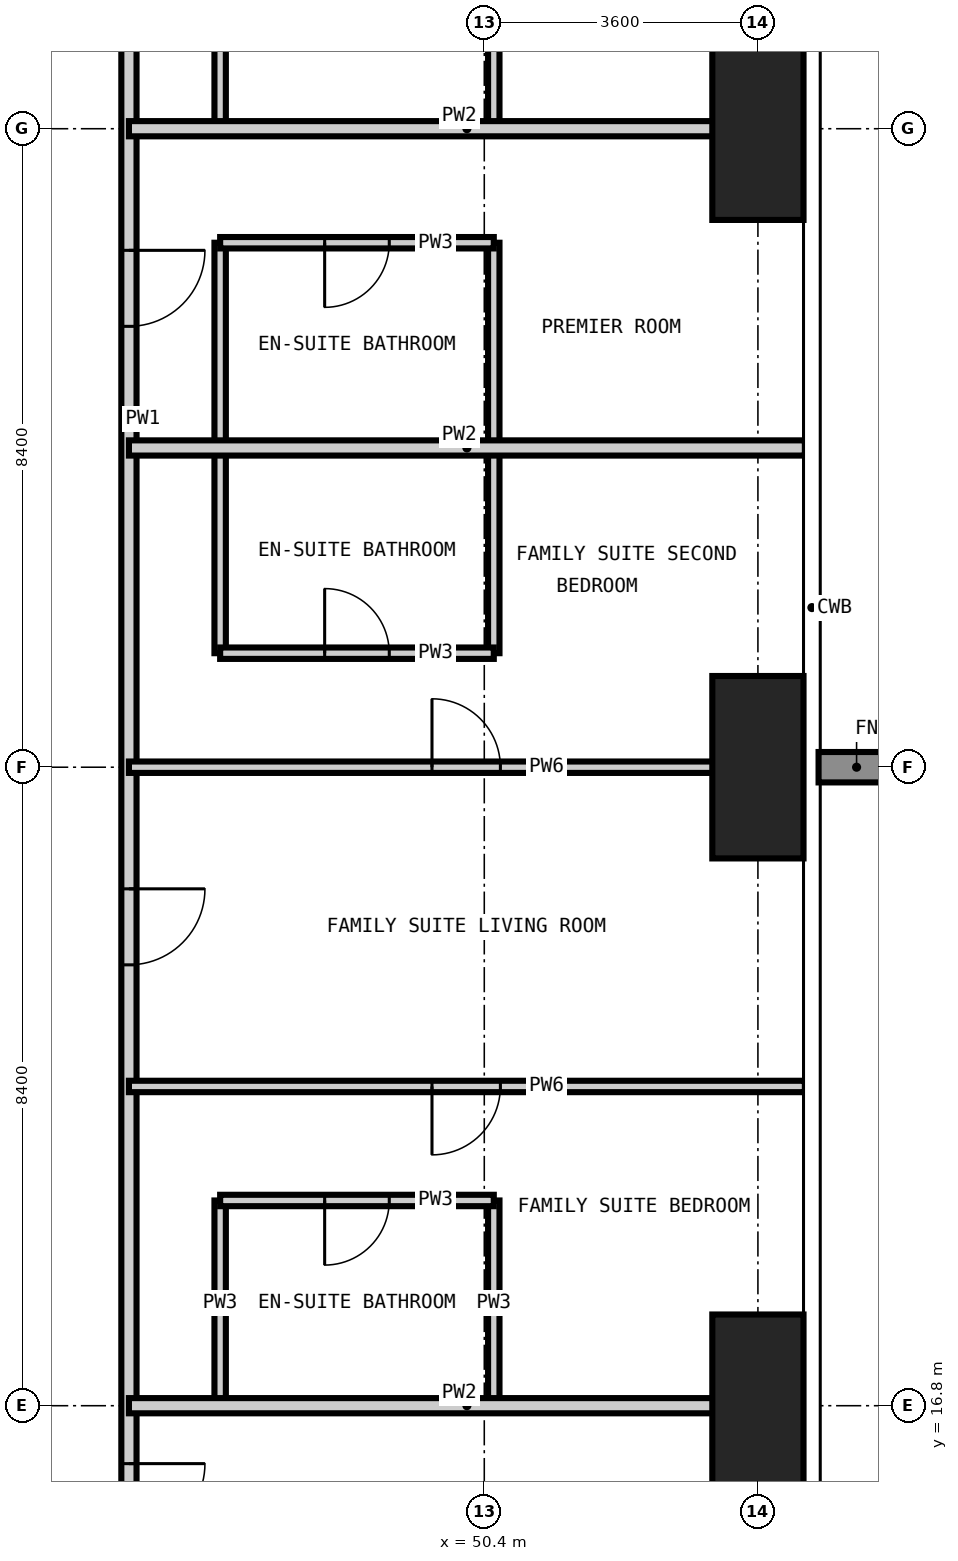
"""IFC4 building model, lengths in metres.
Left out: names, types, materials, properties, quantities, classifications, styles, units other than length and angle.
Written with IfcOpenShell. Run it as: python <this file> out.ifc"""

import sys

from ifc_helpers import new_model, si_unit, direction, frame, frame_2d, origin, origin_2d, place, context, subcontext, project, spatial, rectangle, extrude, element, fill, save


model = new_model("IFC4")
c1 = context("Model", 3, precision=1e-05, world=origin(), true_north=direction((0.0, 1.0)))
c2 = subcontext(c1, "Body", "Model", "MODEL_VIEW")
j1 = project(units=[si_unit("LENGTHUNIT", "METRE"), si_unit("PLANEANGLEUNIT", "RADIAN")], contexts=[c1])
p1 = place(None, origin())
s1 = spatial("IfcSite", under=j1, at=p1, CompositionType="ELEMENT")
p2 = place(p1, origin())
s2 = spatial("IfcBuilding", under=s1, at=p2, CompositionType="ELEMENT")
p3 = place(p2, frame((0.0, 0.0, 133.2)))
s3 = spatial("IfcBuildingStorey", under=s2, at=p3, CompositionType="ELEMENT", Elevation=133.2)
for number, where, z_axis, x_axis in (
    (1, (54.0, 16.8, -0.35), (0.0, 0.0, 1.0), (1.0, 0.0, 0.0)),
    (2, (54.0, 25.2, -0.35), (0.0, 0.0, 1.0), (1.0, 0.0, 0.0)),
    (3, (54.0, 33.6, -0.35), (0.0, 0.0, 1.0), (1.0, 0.0, 0.0)),
):
    element("IfcColumn", number, at=place(p3, frame(where, z_axis=z_axis, x_axis=x_axis)), inside=s3, PredefinedType="COLUMN", context=c2, shape_type="SweptSolid", body=[
        extrude(rectangle(XDim=1.2, YDim=2.4, at=origin_2d()), origin(), (0.0, 0.0, 1.0), 3.6),
    ])
p4 = place(p3, frame((46.925, 16.8, 0.0), z_axis=(0.0, 0.0, 1.0), x_axis=(0.0, 1.0, 0.0)))
e4 = element("IfcWall", 4, at=p4, inside=s3, PredefinedType="PARTITIONING", context=c2, shape_type="SweptSolid", body=[
    extrude(rectangle(XDim=2.7, YDim=0.15, at=frame_2d((1.35, 0.0))), origin(), (0.0, 0.0, 1.0), 3.25),
])
p5 = place(p3, frame((46.925, 26.7, 0.0), z_axis=(0.0, 0.0, 1.0), x_axis=(0.0, 1.0, 0.0)))
e5 = element("IfcWall", 5, at=p5, inside=s3, PredefinedType="PARTITIONING", context=c2, shape_type="SweptSolid", body=[
    extrude(rectangle(XDim=5.4, YDim=0.15, at=frame_2d((2.7, 0.0))), origin(), (0.0, 0.0, 1.0), 3.25),
])
for number, where, z_axis, x_axis in (
    (6, (46.925, 33.6, 0.0), (0.0, 0.0, 1.0), (0.0, 1.0, 0.0)),
    (7, (50.525, 16.8, 0.0), (0.0, 0.0, 1.0), (0.0, 1.0, 0.0)),
):
    element("IfcWall", number, at=place(p3, frame(where, z_axis=z_axis, x_axis=x_axis)), inside=s3, PredefinedType="PARTITIONING", context=c2, shape_type="SweptSolid", body=[
        extrude(rectangle(XDim=2.7, YDim=0.15, at=frame_2d((1.35, 0.0))), origin(), (0.0, 0.0, 1.0), 3.25),
    ])
p6 = place(p3, frame((50.525, 26.7, 0.0), z_axis=(0.0, 0.0, 1.0), x_axis=(0.0, 1.0, 0.0)))
e8 = element("IfcWall", 8, at=p6, inside=s3, PredefinedType="PARTITIONING", context=c2, shape_type="SweptSolid", body=[
    extrude(rectangle(XDim=5.4, YDim=0.15, at=frame_2d((2.7, 0.0))), origin(), (0.0, 0.0, 1.0), 3.25),
])
p7 = place(p3, frame((50.525, 33.6, 0.0), z_axis=(0.0, 0.0, 1.0), x_axis=(0.0, 1.0, 0.0)))
e9 = element("IfcWall", 9, at=p7, inside=s3, PredefinedType="PARTITIONING", context=c2, shape_type="SweptSolid", body=[
    extrude(rectangle(XDim=2.7, YDim=0.15, at=frame_2d((1.35, 0.0))), origin(), (0.0, 0.0, 1.0), 3.25),
])
p8 = place(p3, frame((46.925, 19.5, 0.0), z_axis=(0.0, 0.0, 1.0), x_axis=(1.0, 0.0, 0.0)))
e10 = element("IfcWall", 10, at=p8, inside=s3, PredefinedType="PARTITIONING", context=c2, shape_type="SweptSolid", body=[
    extrude(rectangle(XDim=3.6, YDim=0.15, at=frame_2d((1.8, 0.0))), origin(), (0.0, 0.0, 1.0), 3.25),
])
p9 = place(p8, frame((1.375, 0.0, 0.0)))
e11 = element("IfcOpeningElement", 11, at=p9, cuts=e10, PredefinedType="OPENING", context=c2, shape_type="SweptSolid", body=[
    extrude(rectangle(XDim=0.85, YDim=2.1, at=frame_2d((0.425, 1.05))), frame((0.0, 0.085, 0.0), z_axis=(0.0, -1.0, 0.0), x_axis=(1.0, 0.0, 0.0)), (0.0, 0.0, 1.0), 0.17),
])
p10 = place(p3, frame((46.925, 26.7, 0.0), z_axis=(0.0, 0.0, 1.0), x_axis=(1.0, 0.0, 0.0)))
e12 = element("IfcWall", 12, at=p10, inside=s3, PredefinedType="PARTITIONING", context=c2, shape_type="SweptSolid", body=[
    extrude(rectangle(XDim=3.6, YDim=0.15, at=frame_2d((1.8, 0.0))), origin(), (0.0, 0.0, 1.0), 3.25),
])
p11 = place(p10, frame((1.375, 0.0, 0.0)))
e13 = element("IfcOpeningElement", 13, at=p11, cuts=e12, PredefinedType="OPENING", context=c2, shape_type="SweptSolid", body=[
    extrude(rectangle(XDim=0.85, YDim=2.1, at=frame_2d((0.425, 1.05))), frame((0.0, 0.085, 0.0), z_axis=(0.0, -1.0, 0.0), x_axis=(1.0, 0.0, 0.0)), (0.0, 0.0, 1.0), 0.17),
])
p12 = place(p3, frame((46.925, 32.1, 0.0), z_axis=(0.0, 0.0, 1.0), x_axis=(1.0, 0.0, 0.0)))
e14 = element("IfcWall", 14, at=p12, inside=s3, PredefinedType="PARTITIONING", context=c2, shape_type="SweptSolid", body=[
    extrude(rectangle(XDim=3.6, YDim=0.15, at=frame_2d((1.8, 0.0))), origin(), (0.0, 0.0, 1.0), 3.25),
])
p13 = place(p12, frame((1.375, 0.0, 0.0)))
e15 = element("IfcOpeningElement", 15, at=p13, cuts=e14, PredefinedType="OPENING", context=c2, shape_type="SweptSolid", body=[
    extrude(rectangle(XDim=0.85, YDim=2.1, at=frame_2d((0.425, 1.05))), frame((0.0, 0.085, 0.0), z_axis=(0.0, -1.0, 0.0), x_axis=(1.0, 0.0, 0.0)), (0.0, 0.0, 1.0), 0.17),
])
p14 = place(p3, frame((45.725, 45.125, 0.0), z_axis=(0.0, 0.0, 1.0), x_axis=(0.0, -1.0, 0.0)))
e16 = element("IfcWall", 16, at=p14, inside=s3, PredefinedType="PARTITIONING", context=c2, shape_type="SweptSolid", body=[
    extrude(rectangle(XDim=30.85, YDim=0.2, at=frame_2d((15.425, 0.0))), origin(), (0.0, 0.0, 1.0), 3.25),
])
p15 = place(p14, frame((21.525, 0.0, 0.0)))
e17 = element("IfcOpeningElement", 17, at=p15, cuts=e16, PredefinedType="OPENING", context=c2, shape_type="SweptSolid", body=[
    extrude(rectangle(XDim=1.0, YDim=2.2, at=frame_2d((0.5, 1.1))), frame((0.0, 0.11, 0.0), z_axis=(0.0, -1.0, 0.0), x_axis=(1.0, 0.0, 0.0)), (0.0, 0.0, 1.0), 0.22),
])
p16 = place(p14, frame((13.125, 0.0, 0.0)))
e18 = element("IfcOpeningElement", 18, at=p16, cuts=e16, PredefinedType="OPENING", context=c2, shape_type="SweptSolid", body=[
    extrude(rectangle(XDim=1.0, YDim=2.2, at=frame_2d((0.5, 1.1))), frame((0.0, 0.11, 0.0), z_axis=(0.0, -1.0, 0.0), x_axis=(1.0, 0.0, 0.0)), (0.0, 0.0, 1.0), 0.22),
])
p17 = place(p14, frame((6.825, 0.0, 0.0)))
e19 = element("IfcOpeningElement", 19, at=p17, cuts=e16, PredefinedType="OPENING", context=c2, shape_type="SweptSolid", body=[
    extrude(rectangle(XDim=1.0, YDim=2.2, at=frame_2d((0.5, 1.1))), frame((0.0, 0.11, 0.0), z_axis=(0.0, -1.0, 0.0), x_axis=(1.0, 0.0, 0.0)), (0.0, 0.0, 1.0), 0.22),
])
p18 = place(p14, frame((29.087, 0.0, 0.0)))
e20 = element("IfcOpeningElement", 20, at=p18, cuts=e16, PredefinedType="OPENING", context=c2, shape_type="SweptSolid", body=[
    extrude(rectangle(XDim=1.0, YDim=2.2, at=frame_2d((0.5, 1.1))), frame((0.0, 0.11, 0.0), z_axis=(0.0, -1.0, 0.0), x_axis=(1.0, 0.0, 0.0)), (0.0, 0.0, 1.0), 0.22),
])
p19 = place(p14, frame((1.063, 0.0, 0.0)))
e21 = element("IfcOpeningElement", 21, at=p19, cuts=e16, PredefinedType="OPENING", context=c2, shape_type="SweptSolid", body=[
    extrude(rectangle(XDim=1.0, YDim=2.2, at=frame_2d((0.5, 1.1))), frame((0.0, 0.11, 0.0), z_axis=(0.0, -1.0, 0.0), x_axis=(1.0, 0.0, 0.0)), (0.0, 0.0, 1.0), 0.22),
])
for number, where, z_axis, x_axis in (
    (22, (45.725, 16.8, 0.0), (0.0, 0.0, 1.0), (1.0, 0.0, 0.0)),
    (23, (45.725, 29.4, 0.0), (0.0, 0.0, 1.0), (1.0, 0.0, 0.0)),
    (24, (45.725, 33.6, 0.0), (0.0, 0.0, 1.0), (1.0, 0.0, 0.0)),
):
    element("IfcWall", number, at=place(p3, frame(where, z_axis=z_axis, x_axis=x_axis)), inside=s3, PredefinedType="PARTITIONING", context=c2, shape_type="SweptSolid", body=[
        extrude(rectangle(XDim=8.893, YDim=0.2, at=frame_2d((4.446, 0.0))), origin(), (0.0, 0.0, 1.0), 3.25),
    ])
p20 = place(p3, frame((45.725, 21.0, 0.0), z_axis=(0.0, 0.0, 1.0), x_axis=(1.0, 0.0, 0.0)))
e25 = element("IfcWall", 25, at=p20, inside=s3, PredefinedType="PARTITIONING", context=c2, shape_type="SweptSolid", body=[
    extrude(rectangle(XDim=8.893, YDim=0.15, at=frame_2d((4.446, 0.0))), origin(), (0.0, 0.0, 1.0), 3.25),
])
p21 = place(p20, frame((3.987, 0.0, 0.0)))
e26 = element("IfcOpeningElement", 26, at=p21, cuts=e25, PredefinedType="OPENING", context=c2, shape_type="SweptSolid", body=[
    extrude(rectangle(XDim=0.9, YDim=2.1, at=frame_2d((0.45, 1.05))), frame((0.0, 0.085, 0.0), z_axis=(0.0, -1.0, 0.0), x_axis=(1.0, 0.0, 0.0)), (0.0, 0.0, 1.0), 0.17),
])
p22 = place(p3, frame((45.725, 25.2, 0.0), z_axis=(0.0, 0.0, 1.0), x_axis=(1.0, 0.0, 0.0)))
e27 = element("IfcWall", 27, at=p22, inside=s3, PredefinedType="PARTITIONING", context=c2, shape_type="SweptSolid", body=[
    extrude(rectangle(XDim=8.893, YDim=0.15, at=frame_2d((4.446, 0.0))), origin(), (0.0, 0.0, 1.0), 3.25),
])
p23 = place(p22, frame((3.987, 0.0, 0.0)))
e28 = element("IfcOpeningElement", 28, at=p23, cuts=e27, PredefinedType="OPENING", context=c2, shape_type="SweptSolid", body=[
    extrude(rectangle(XDim=0.9, YDim=2.1, at=frame_2d((0.45, 1.05))), frame((0.0, 0.085, 0.0), z_axis=(0.0, -1.0, 0.0), x_axis=(1.0, 0.0, 0.0)), (0.0, 0.0, 1.0), 0.17),
])
p24 = place(p15, origin())
e29 = element("IfcDoor", 29, at=p24, inside=s3, OperationType="SINGLE_SWING_LEFT", PredefinedType="DOOR", context=c2, shape_type="SweptSolid", body=[
    extrude(rectangle(XDim=1.0, YDim=2.2, at=frame_2d((0.5, 1.1))), frame((0.0, 0.025, 0.0), z_axis=(0.0, -1.0, 0.0), x_axis=(1.0, 0.0, 0.0)), (0.0, 0.0, 1.0), 0.05),
])
fill(e17, e29)
p25 = place(p21, frame((0.9, 0.0, 0.0), z_axis=(0.0, 0.0, 1.0), x_axis=(-1.0, 0.0, 0.0)))
e30 = element("IfcDoor", 30, at=p25, inside=s3, OperationType="SINGLE_SWING_RIGHT", PredefinedType="DOOR", context=c2, shape_type="SweptSolid", body=[
    extrude(rectangle(XDim=0.9, YDim=2.1, at=frame_2d((0.45, 1.05))), frame((0.0, 0.025, 0.0), z_axis=(0.0, -1.0, 0.0), x_axis=(1.0, 0.0, 0.0)), (0.0, 0.0, 1.0), 0.05),
])
fill(e26, e30)
p26 = place(p9, frame((0.85, 0.0, 0.0), z_axis=(0.0, 0.0, 1.0), x_axis=(-1.0, 0.0, 0.0)))
e31 = element("IfcDoor", 31, at=p26, inside=s3, OperationType="SINGLE_SWING_RIGHT", PredefinedType="DOOR", context=c2, shape_type="SweptSolid", body=[
    extrude(rectangle(XDim=0.85, YDim=2.1, at=frame_2d((0.425, 1.05))), frame((0.0, 0.025, 0.0), z_axis=(0.0, -1.0, 0.0), x_axis=(1.0, 0.0, 0.0)), (0.0, 0.0, 1.0), 0.05),
])
fill(e11, e31)
p27 = place(p23, origin())
e32 = element("IfcDoor", 32, at=p27, inside=s3, OperationType="SINGLE_SWING_LEFT", PredefinedType="DOOR", context=c2, shape_type="SweptSolid", body=[
    extrude(rectangle(XDim=0.9, YDim=2.1, at=frame_2d((0.45, 1.05))), frame((0.0, 0.025, 0.0), z_axis=(0.0, -1.0, 0.0), x_axis=(1.0, 0.0, 0.0)), (0.0, 0.0, 1.0), 0.05),
])
fill(e28, e32)
p28 = place(p11, origin())
e33 = element("IfcDoor", 33, at=p28, inside=s3, OperationType="SINGLE_SWING_LEFT", PredefinedType="DOOR", context=c2, shape_type="SweptSolid", body=[
    extrude(rectangle(XDim=0.85, YDim=2.1, at=frame_2d((0.425, 1.05))), frame((0.0, 0.025, 0.0), z_axis=(0.0, -1.0, 0.0), x_axis=(1.0, 0.0, 0.0)), (0.0, 0.0, 1.0), 0.05),
])
fill(e13, e33)
p29 = place(p16, origin())
e34 = element("IfcDoor", 34, at=p29, inside=s3, OperationType="SINGLE_SWING_LEFT", PredefinedType="DOOR", context=c2, shape_type="SweptSolid", body=[
    extrude(rectangle(XDim=1.0, YDim=2.2, at=frame_2d((0.5, 1.1))), frame((0.0, 0.025, 0.0), z_axis=(0.0, -1.0, 0.0), x_axis=(1.0, 0.0, 0.0)), (0.0, 0.0, 1.0), 0.05),
])
fill(e18, e34)
p30 = place(p13, frame((0.85, 0.0, 0.0), z_axis=(0.0, 0.0, 1.0), x_axis=(-1.0, 0.0, 0.0)))
e35 = element("IfcDoor", 35, at=p30, inside=s3, OperationType="SINGLE_SWING_RIGHT", PredefinedType="DOOR", context=c2, shape_type="SweptSolid", body=[
    extrude(rectangle(XDim=0.85, YDim=2.1, at=frame_2d((0.425, 1.05))), frame((0.0, 0.025, 0.0), z_axis=(0.0, -1.0, 0.0), x_axis=(1.0, 0.0, 0.0)), (0.0, 0.0, 1.0), 0.05),
])
fill(e15, e35)
p31 = place(p18, origin())
e36 = element("IfcDoor", 36, at=p31, inside=s3, OperationType="SINGLE_SWING_LEFT", PredefinedType="DOOR", context=c2, shape_type="SweptSolid", body=[
    extrude(rectangle(XDim=1.0, YDim=2.2, at=frame_2d((0.5, 1.1))), frame((0.0, 0.025, 0.0), z_axis=(0.0, -1.0, 0.0), x_axis=(1.0, 0.0, 0.0)), (0.0, 0.0, 1.0), 0.05),
])
fill(e20, e36)
save(model, sys.argv[1])
